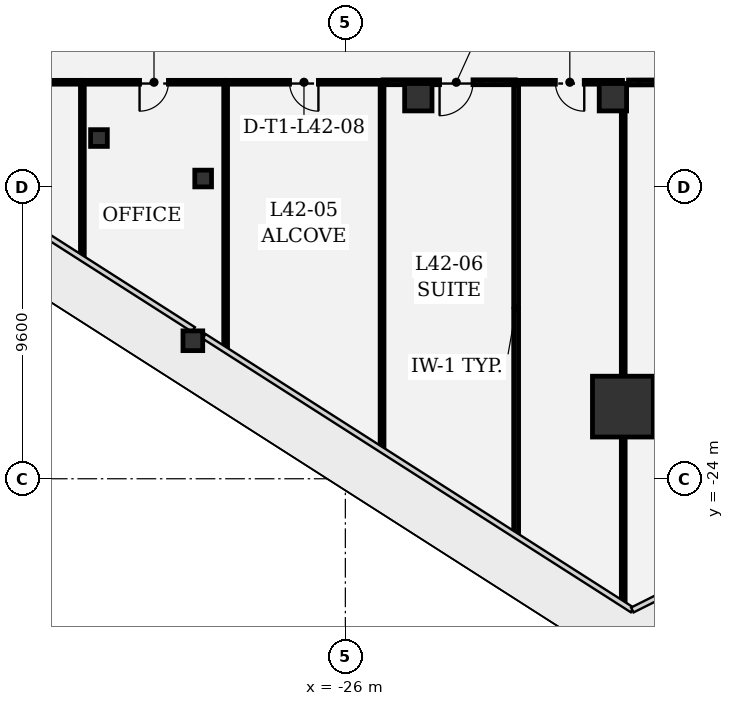
"""IFC4 building model, lengths in metres.
Left out: names, types, materials, properties, quantities, classifications, styles, units other than length and angle.
Written with IfcOpenShell. Run it as: python <this file> out.ifc"""

import sys

from ifc_helpers import new_model, si_unit, direction, frame, frame_2d, origin, origin_2d, place, context, subcontext, project, spatial, rectangle, extrude, element, fill, save


model = new_model("IFC4")
c1 = context("Model", 3, precision=1e-05, world=origin(), true_north=direction((0.0, 1.0)))
c2 = subcontext(c1, "Body", "Model", "MODEL_VIEW")
j1 = project(units=[si_unit("LENGTHUNIT", "METRE"), si_unit("PLANEANGLEUNIT", "RADIAN")], contexts=[c1])
p1 = place(None, origin())
s1 = spatial("IfcSite", under=j1, at=p1, CompositionType="ELEMENT")
p2 = place(p1, origin())
s2 = spatial("IfcBuilding", under=s1, at=p2, CompositionType="ELEMENT")
p3 = place(p2, frame((0.0, 0.0, 184.8)))
s3 = spatial("IfcBuildingStorey", under=s2, at=p3, CompositionType="ELEMENT", Elevation=184.8)
p4 = place(p3, frame((-16.872, -21.627, 0.0), z_axis=(0.0, 0.0, 1.0), x_axis=(1.0, 0.0, 0.0)))
e1 = element("IfcColumn", 1, at=p4, inside=s3, PredefinedType="COLUMN", context=c2, shape_type="SweptSolid", body=[
    extrude(rectangle(XDim=2.0, YDim=2.0, at=origin_2d()), origin(), (0.0, 0.0, 1.0), 4.05),
])
for number, where, z_axis, x_axis in (
    (2, (-17.2, -11.45, 0.0), (0.0, 0.0, 1.0), (1.0, 0.0, 0.0)),
    (3, (-23.6, -11.45, 0.0), (0.0, 0.0, 1.0), (1.0, 0.0, 0.0)),
):
    element("IfcColumn", number, at=place(p3, frame(where, z_axis=z_axis, x_axis=x_axis)), inside=s3, PredefinedType="COLUMN", context=c2, shape_type="SweptSolid", body=[
        extrude(rectangle(XDim=0.9, YDim=0.9, at=origin_2d()), origin(), (0.0, 0.0, 1.0), 4.05),
    ])
p5 = place(p3, frame((-31.016, -19.46, 0.0), z_axis=(0.0, 0.0, 1.0), x_axis=(1.0, 0.0, 0.0)))
e4 = element("IfcColumn", 4, at=p5, inside=s3, PredefinedType="COLUMN", context=c2, shape_type="SweptSolid", body=[
    extrude(rectangle(XDim=0.65, YDim=0.65, at=origin_2d()), origin(), (0.0, 0.0, 1.0), 4.05),
])
for number, where, z_axis, x_axis in (
    (5, (-34.104, -12.792, 0.0), (0.0, 0.0, 1.0), (1.0, 0.0, 0.0)),
    (6, (-30.677, -14.124, 0.0), (0.0, 0.0, 1.0), (1.0, 0.0, 0.0)),
):
    element("IfcColumn", number, at=place(p3, frame(where, z_axis=z_axis, x_axis=x_axis)), inside=s3, PredefinedType="COLUMN", context=c2, shape_type="SweptSolid", body=[
        extrude(rectangle(XDim=0.55, YDim=0.55, at=origin_2d()), origin(), (0.0, 0.0, 1.0), 4.05),
    ])
p6 = place(p3, frame((-29.963, -10.958, 0.0), z_axis=(0.0, 0.0, 1.0), x_axis=(-1.0, 0.0, 0.0)))
e7 = element("IfcWall", 7, at=p6, inside=s3, PredefinedType="PARTITIONING", context=c2, shape_type="SweptSolid", body=[
    extrude(rectangle(XDim=4.662, YDim=0.125, at=frame_2d((2.331, 0.0))), origin(), (0.0, 0.0, 1.0), 2.9),
])
p7 = place(p6, frame((1.856, 0.0, 0.0)))
e8 = element("IfcOpeningElement", 8, at=p7, cuts=e7, PredefinedType="OPENING", context=c2, shape_type="SweptSolid", body=[
    extrude(rectangle(XDim=0.95, YDim=2.15, at=frame_2d((0.475, 1.075))), frame((0.0, 0.073, 0.0), z_axis=(0.0, -1.0, 0.0), x_axis=(1.0, 0.0, 0.0)), (0.0, 0.0, 1.0), 0.145),
])
p8 = place(p3, frame((-34.65, -10.983, 0.0), z_axis=(0.0, 0.0, 1.0), x_axis=(0.0, -1.0, 0.0)))
e9 = element("IfcWall", 9, at=p8, inside=s3, PredefinedType="PARTITIONING", context=c2, shape_type="SweptSolid", body=[
    extrude(rectangle(XDim=5.693, YDim=0.125, at=frame_2d((2.846, 0.0))), origin(), (0.0, 0.0, 1.0), 3.78),
])
p9 = place(p3, frame((-29.938, -19.687, 0.0), z_axis=(0.0, 0.0, 1.0), x_axis=(0.0, 1.0, 0.0)))
e10 = element("IfcWall", 10, at=p9, inside=s3, PredefinedType="PARTITIONING", context=c2, shape_type="SweptSolid", body=[
    extrude(rectangle(XDim=8.704, YDim=0.125, at=frame_2d((4.352, 0.0))), origin(), (0.0, 0.0, 1.0), 3.78),
])
p10 = place(p3, frame((-24.792, -22.976, 0.0), z_axis=(0.0, 0.0, 1.0), x_axis=(0.0, 1.0, 0.0)))
e11 = element("IfcWall", 11, at=p10, inside=s3, PredefinedType="PARTITIONING", context=c2, shape_type="SweptSolid", body=[
    extrude(rectangle(XDim=11.993, YDim=0.125, at=frame_2d((5.996, 0.0))), origin(), (0.0, 0.0, 1.0), 3.344),
])
p11 = place(p3, frame((-24.817, -10.958, 0.0), z_axis=(0.0, 0.0, 1.0), x_axis=(-1.0, 0.0, 0.0)))
e12 = element("IfcWall", 12, at=p11, inside=s3, PredefinedType="PARTITIONING", context=c2, shape_type="SweptSolid", body=[
    extrude(rectangle(XDim=5.087, YDim=0.125, at=frame_2d((2.544, 0.0))), origin(), (0.0, 0.0, 1.0), 3.78),
])
p12 = place(p11, frame((2.069, 0.0, 0.0)))
e13 = element("IfcOpeningElement", 13, at=p12, cuts=e12, PredefinedType="OPENING", context=c2, shape_type="SweptSolid", body=[
    extrude(rectangle(XDim=0.95, YDim=2.15, at=frame_2d((0.475, 1.075))), frame((0.0, 0.073, 0.0), z_axis=(0.0, -1.0, 0.0), x_axis=(1.0, 0.0, 0.0)), (0.0, 0.0, 1.0), 0.145),
])
p13 = place(p3, frame((-20.383, -25.794, 0.0), z_axis=(0.0, 0.0, 1.0), x_axis=(0.0, 1.0, 0.0)))
e14 = element("IfcWall", 14, at=p13, inside=s3, PredefinedType="PARTITIONING", context=c2, shape_type="SweptSolid", body=[
    extrude(rectangle(XDim=14.811, YDim=0.16, at=frame_2d((7.406, 0.0))), origin(), (0.0, 0.0, 1.0), 2.895),
])
p14 = place(p3, frame((-20.408, -10.958, 0.0), z_axis=(0.0, 0.0, 1.0), x_axis=(-1.0, 0.0, 0.0)))
e15 = element("IfcWall", 15, at=p14, inside=s3, PredefinedType="PARTITIONING", context=c2, shape_type="SweptSolid", body=[
    extrude(rectangle(XDim=4.352, YDim=0.16, at=frame_2d((2.176, 0.0))), origin(), (0.0, 0.0, 1.0), 3.78),
])
p15 = place(p14, frame((1.394, 0.0, 0.0)))
e16 = element("IfcOpeningElement", 16, at=p15, cuts=e15, PredefinedType="OPENING", context=c2, shape_type="SweptSolid", body=[
    extrude(rectangle(XDim=1.1, YDim=2.15, at=frame_2d((0.55, 1.075))), frame((0.0, 0.09, 0.0), z_axis=(0.0, -1.0, 0.0), x_axis=(1.0, 0.0, 0.0)), (0.0, 0.0, 1.0), 0.18),
])
p16 = place(p3, frame((-16.885, -10.958, 0.0), z_axis=(0.0, 0.0, 1.0), x_axis=(-1.0, 0.0, 0.0)))
e17 = element("IfcWall", 17, at=p16, inside=s3, PredefinedType="PARTITIONING", context=c2, shape_type="SweptSolid", body=[
    extrude(rectangle(XDim=3.465, YDim=0.125, at=frame_2d((1.732, 0.0))), origin(), (0.0, 0.0, 1.0), 3.344),
])
p17 = place(p16, frame((1.258, 0.0, 0.0)))
e18 = element("IfcOpeningElement", 18, at=p17, cuts=e17, PredefinedType="OPENING", context=c2, shape_type="SweptSolid", body=[
    extrude(rectangle(XDim=0.95, YDim=2.15, at=frame_2d((0.475, 1.075))), frame((0.0, 0.073, 0.0), z_axis=(0.0, -1.0, 0.0), x_axis=(1.0, 0.0, 0.0)), (0.0, 0.0, 1.0), 0.145),
])
p18 = place(p3, frame((-16.86, -28.046, 0.0), z_axis=(0.0, 0.0, 1.0), x_axis=(0.0, 1.0, 0.0)))
e19 = element("IfcWall", 19, at=p18, inside=s3, PredefinedType="PARTITIONING", context=c2, shape_type="SweptSolid", body=[
    extrude(rectangle(XDim=5.354, YDim=0.125, at=frame_2d((2.677, 0.0))), origin(), (0.0, 0.0, 1.0), 3.78),
])
p19 = place(p3, frame((-16.86, -20.562, 0.0), z_axis=(0.0, 0.0, 1.0), x_axis=(0.0, 1.0, 0.0)))
e20 = element("IfcWall", 20, at=p19, inside=s3, PredefinedType="PARTITIONING", context=c2, shape_type="SweptSolid", body=[
    extrude(rectangle(XDim=8.597, YDim=0.125, at=frame_2d((4.298, 0.0))), origin(), (0.0, 0.0, 1.0), 2.9),
])
p20 = place(p3, frame((-13.175, -10.958, 0.0), z_axis=(0.0, 0.0, 1.0), x_axis=(-0.999997523311, -0.002225616967, 0.0)))
e21 = element("IfcWall", 21, at=p20, inside=s3, PredefinedType="PARTITIONING", context=c2, shape_type="SweptSolid", body=[
    extrude(rectangle(XDim=3.51, YDim=0.16, at=frame_2d((1.755, 0.0))), origin(), (0.0, 0.0, 1.0), 3.344),
])
p21 = place(p20, frame((1.205, 0.0, 0.0)))
e22 = element("IfcOpeningElement", 22, at=p21, cuts=e21, PredefinedType="OPENING", context=c2, shape_type="SweptSolid", body=[
    extrude(rectangle(XDim=1.1, YDim=2.15, at=frame_2d((0.55, 1.075))), frame((0.0, 0.09, 0.0), z_axis=(0.0, -1.0, 0.0), x_axis=(1.0, 0.0, 0.0)), (0.0, 0.0, 1.0), 0.18),
])
p22 = place(p3, frame((-37.833, -10.958, 0.0), z_axis=(0.0, 0.0, 1.0), x_axis=(1.0, 0.0, 0.0)))
e23 = element("IfcWall", 23, at=p22, inside=s3, PredefinedType="PARTITIONING", context=c2, shape_type="SweptSolid", body=[
    extrude(rectangle(XDim=3.15, YDim=0.125, at=frame_2d((1.575, 0.0))), origin(), (0.0, 0.0, 1.0), 2.9),
])
p23 = place(p7, origin())
e24 = element("IfcDoor", 24, at=p23, inside=s3, OperationType="SINGLE_SWING_RIGHT", PredefinedType="DOOR", context=c2, shape_type="SweptSolid", body=[
    extrude(rectangle(XDim=0.95, YDim=2.15, at=frame_2d((0.475, 1.075))), frame((0.0, 0.025, 0.0), z_axis=(0.0, -1.0, 0.0), x_axis=(1.0, 0.0, 0.0)), (0.0, 0.0, 1.0), 0.05),
])
fill(e8, e24)
p24 = place(p12, origin())
e25 = element("IfcDoor", 25, at=p24, inside=s3, OperationType="SINGLE_SWING_LEFT", PredefinedType="DOOR", context=c2, shape_type="SweptSolid", body=[
    extrude(rectangle(XDim=0.95, YDim=2.15, at=frame_2d((0.475, 1.075))), frame((0.0, 0.025, 0.0), z_axis=(0.0, -1.0, 0.0), x_axis=(1.0, 0.0, 0.0)), (0.0, 0.0, 1.0), 0.05),
])
fill(e13, e25)
p25 = place(p15, origin())
e26 = element("IfcDoor", 26, at=p25, inside=s3, OperationType="SINGLE_SWING_RIGHT", PredefinedType="DOOR", context=c2, shape_type="SweptSolid", body=[
    extrude(rectangle(XDim=1.1, YDim=2.15, at=frame_2d((0.55, 1.075))), frame((0.0, 0.025, 0.0), z_axis=(0.0, -1.0, 0.0), x_axis=(1.0, 0.0, 0.0)), (0.0, 0.0, 1.0), 0.05),
])
fill(e16, e26)
p26 = place(p17, origin())
e27 = element("IfcDoor", 27, at=p26, inside=s3, OperationType="SINGLE_SWING_LEFT", PredefinedType="DOOR", context=c2, shape_type="SweptSolid", body=[
    extrude(rectangle(XDim=0.95, YDim=2.15, at=frame_2d((0.475, 1.075))), frame((0.0, 0.025, 0.0), z_axis=(0.0, -1.0, 0.0), x_axis=(1.0, 0.0, 0.0)), (0.0, 0.0, 1.0), 0.05),
])
fill(e18, e27)
save(model, sys.argv[1])
